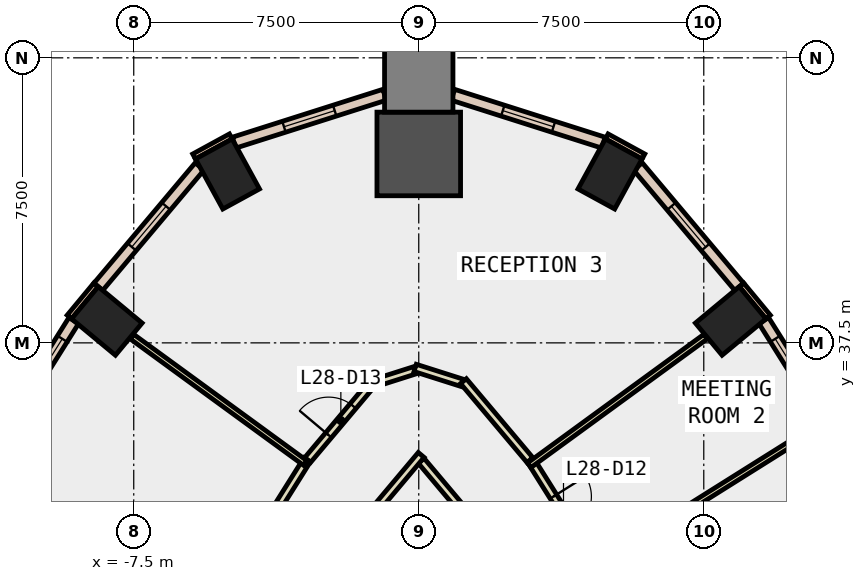
"""IFC4 building model, lengths in metres.
Left out: names, types, materials, properties, quantities, classifications, styles, units other than length and angle.
Written with IfcOpenShell. Run it as: python <this file> out.ifc"""

import sys

from ifc_helpers import new_model, si_unit, direction, frame, frame_2d, origin, origin_2d, place, context, subcontext, project, spatial, rectangle, extrude, element, fill, save


model = new_model("IFC4")
c1 = context("Model", 3, precision=1e-05, world=origin(), true_north=direction((0.0, 1.0)))
c2 = subcontext(c1, "Body", "Model", "MODEL_VIEW")
j1 = project(units=[si_unit("LENGTHUNIT", "METRE"), si_unit("PLANEANGLEUNIT", "RADIAN")], contexts=[c1])
p1 = place(None, origin())
s1 = spatial("IfcSite", under=j1, at=p1, CompositionType="ELEMENT")
p2 = place(p1, origin())
s2 = spatial("IfcBuilding", under=s1, at=p2, CompositionType="ELEMENT")
p3 = place(p2, frame((0.0, 0.0, 128.6)))
s3 = spatial("IfcBuildingStorey", under=s2, at=p3, CompositionType="ELEMENT", Elevation=128.6)
for number, where, z_axis, x_axis in (
    (1, (8.208, 38.077, -0.4), (0.0, 0.0, 1.0), (-0.638, 0.77, 0.0)),
    (2, (5.033, 41.944, -0.4), (0.0, 0.0, 1.0), (-0.877, 0.48, 0.0)),
):
    element("IfcColumn", number, at=place(p3, frame(where, z_axis=z_axis, x_axis=x_axis)), inside=s3, PredefinedType="COLUMN", context=c2, shape_type="SweptSolid", body=[
        extrude(rectangle(XDim=1.1, YDim=1.5, at=origin_2d()), origin(), (0.0, 0.0, 1.0), 4.0),
    ])
p4 = place(p3, frame((0.0, 42.471, -0.4), z_axis=(0.0, 0.0, 1.0), x_axis=(0.0, 1.0, 0.0)))
e3 = element("IfcColumn", 3, at=p4, inside=s3, PredefinedType="COLUMN", context=c2, shape_type="SweptSolid", body=[
    extrude(rectangle(XDim=2.2, YDim=2.2, at=origin_2d()), origin(), (0.0, 0.0, 1.0), 4.0),
])
for number, where, z_axis, x_axis in (
    (4, (-5.033, 41.944, -0.4), (0.0, 0.0, 1.0), (0.877, 0.48, 0.0)),
    (5, (-8.208, 38.077, -0.4), (0.0, 0.0, 1.0), (0.638, 0.77, 0.0)),
):
    element("IfcColumn", number, at=place(p3, frame(where, z_axis=z_axis, x_axis=x_axis)), inside=s3, PredefinedType="COLUMN", context=c2, shape_type="SweptSolid", body=[
        extrude(rectangle(XDim=1.1, YDim=1.5, at=origin_2d()), origin(), (0.0, 0.0, 1.0), 4.0),
    ])
p5 = place(p3, frame((0.0, 44.471, -0.4), z_axis=(0.0, 0.0, 1.0), x_axis=(0.0, 1.0, 0.0)))
e6 = element("IfcColumn", 6, at=p5, inside=s3, PredefinedType="COLUMN", context=c2, shape_type="SweptSolid", body=[
    extrude(rectangle(XDim=1.8, YDim=1.8, at=origin_2d()), origin(), (0.0, 0.0, 1.0), 4.0),
])
for number, where, z_axis, x_axis in (
    (7, (5.912, 42.404, 0.0), (0.0, 0.0, 1.0), (-0.878, 0.479, 0.0)),
    (8, (-4.946, 42.932, 0.0), (0.0, 0.0, 1.0), (-0.878, -0.479, 0.0)),
):
    element("IfcWall", number, at=place(p3, frame(where, z_axis=z_axis, x_axis=x_axis)), inside=s3, PredefinedType="STANDARD", context=c2, shape_type="SweptSolid", body=[
        extrude(rectangle(XDim=1.101, YDim=0.15, at=frame_2d((0.55, 0.0))), origin(), (0.0, 0.0, 1.0), 3.6),
    ])
for number, where, z_axis, x_axis in (
    (9, (9.194, 38.181, 0.0), (0.0, 0.0, 1.0), (-0.639, 0.77, 0.0)),
    (10, (-8.492, 39.027, 0.0), (0.0, 0.0, 1.0), (-0.639, -0.77, 0.0)),
):
    element("IfcWall", number, at=place(p3, frame(where, z_axis=z_axis, x_axis=x_axis)), inside=s3, PredefinedType="STANDARD", context=c2, shape_type="SweptSolid", body=[
        extrude(rectangle(XDim=1.1, YDim=0.15, at=frame_2d((0.55, 0.0))), origin(), (0.0, 0.0, 1.0), 3.6),
    ])
p6 = place(p3, frame((12.41, 32.779, 0.0), z_axis=(0.0, 0.0, 1.0), x_axis=(-0.53160564075, 0.846991996847, 0.0)))
e11 = element("IfcWall", 11, at=p6, inside=s3, PredefinedType="STANDARD", context=c2, shape_type="SweptSolid", body=[
    extrude(rectangle(XDim=6.266, YDim=0.3, at=frame_2d((3.133, 0.0))), origin(), (0.0, 0.0, 1.0), 3.6),
])
p7 = place(p6, frame((0.566, 0.0, 0.9)))
e12 = element("IfcOpeningElement", 12, at=p7, cuts=e11, PredefinedType="OPENING", context=c2, shape_type="SweptSolid", body=[
    extrude(rectangle(XDim=2.0, YDim=2.6, at=frame_2d((1.0, 1.3))), frame((0.0, 0.16, 0.0), z_axis=(0.0, -1.0, 0.0), x_axis=(1.0, 0.0, 0.0)), (0.0, 0.0, 1.0), 0.32),
])
p8 = place(p6, frame((3.699, 0.0, 0.9)))
e13 = element("IfcOpeningElement", 13, at=p8, cuts=e11, PredefinedType="OPENING", context=c2, shape_type="SweptSolid", body=[
    extrude(rectangle(XDim=2.0, YDim=2.6, at=frame_2d((1.0, 1.3))), frame((0.0, 0.16, 0.0), z_axis=(0.0, -1.0, 0.0), x_axis=(1.0, 0.0, 0.0)), (0.0, 0.0, 1.0), 0.32),
])
p9 = place(p3, frame((8.432, 38.976, 0.0), z_axis=(0.0, 0.0, 1.0), x_axis=(-0.643948600943, 0.765068754652, 0.0)))
e14 = element("IfcWall", 14, at=p9, inside=s3, PredefinedType="STANDARD", context=c2, shape_type="SweptSolid", body=[
    extrude(rectangle(XDim=4.138, YDim=0.3, at=frame_2d((2.069, 0.0))), origin(), (0.0, 0.0, 1.0), 3.6),
])
p10 = place(p9, frame((1.369, 0.0, 0.9)))
e15 = element("IfcOpeningElement", 15, at=p10, cuts=e14, PredefinedType="OPENING", context=c2, shape_type="SweptSolid", body=[
    extrude(rectangle(XDim=1.4, YDim=2.6, at=frame_2d((0.7, 1.3))), frame((0.0, 0.16, 0.0), z_axis=(0.0, -1.0, 0.0), x_axis=(1.0, 0.0, 0.0)), (0.0, 0.0, 1.0), 0.32),
])
p11 = place(p3, frame((4.859, 42.769, 0.0), z_axis=(0.0, 0.0, 1.0), x_axis=(-0.952992117398, 0.30299508936, 0.0)))
e16 = element("IfcWall", 16, at=p11, inside=s3, PredefinedType="STANDARD", context=c2, shape_type="SweptSolid", body=[
    extrude(rectangle(XDim=4.155, YDim=0.3, at=frame_2d((2.078, 0.0))), origin(), (0.0, 0.0, 1.0), 3.6),
])
p12 = place(p11, frame((1.378, 0.0, 0.9)))
e17 = element("IfcOpeningElement", 17, at=p12, cuts=e16, PredefinedType="OPENING", context=c2, shape_type="SweptSolid", body=[
    extrude(rectangle(XDim=1.4, YDim=2.6, at=frame_2d((0.7, 1.3))), frame((0.0, 0.16, 0.0), z_axis=(0.0, -1.0, 0.0), x_axis=(1.0, 0.0, 0.0)), (0.0, 0.0, 1.0), 0.32),
])
p13 = place(p3, frame((-0.899, 44.028, 0.0), z_axis=(0.0, 0.0, 1.0), x_axis=(-0.952992117398, -0.30299508936, 0.0)))
e18 = element("IfcWall", 18, at=p13, inside=s3, PredefinedType="STANDARD", context=c2, shape_type="SweptSolid", body=[
    extrude(rectangle(XDim=4.155, YDim=0.3, at=frame_2d((2.078, 0.0))), origin(), (0.0, 0.0, 1.0), 3.6),
])
p14 = place(p13, frame((1.378, 0.0, 0.9)))
e19 = element("IfcOpeningElement", 19, at=p14, cuts=e18, PredefinedType="OPENING", context=c2, shape_type="SweptSolid", body=[
    extrude(rectangle(XDim=1.4, YDim=2.6, at=frame_2d((0.7, 1.3))), frame((0.0, 0.16, 0.0), z_axis=(0.0, -1.0, 0.0), x_axis=(1.0, 0.0, 0.0)), (0.0, 0.0, 1.0), 0.32),
])
p15 = place(p3, frame((-5.767, 42.142, 0.0), z_axis=(0.0, 0.0, 1.0), x_axis=(-0.643948600943, -0.765068754652, 0.0)))
e20 = element("IfcWall", 20, at=p15, inside=s3, PredefinedType="STANDARD", context=c2, shape_type="SweptSolid", body=[
    extrude(rectangle(XDim=4.138, YDim=0.3, at=frame_2d((2.069, 0.0))), origin(), (0.0, 0.0, 1.0), 3.6),
])
p16 = place(p15, frame((1.369, 0.0, 0.9)))
e21 = element("IfcOpeningElement", 21, at=p16, cuts=e20, PredefinedType="OPENING", context=c2, shape_type="SweptSolid", body=[
    extrude(rectangle(XDim=1.4, YDim=2.6, at=frame_2d((0.7, 1.3))), frame((0.0, 0.16, 0.0), z_axis=(0.0, -1.0, 0.0), x_axis=(1.0, 0.0, 0.0)), (0.0, 0.0, 1.0), 0.32),
])
p17 = place(p3, frame((-9.079, 38.086, 0.0), z_axis=(0.0, 0.0, 1.0), x_axis=(-0.53160564075, -0.846991996847, 0.0)))
e22 = element("IfcWall", 22, at=p17, inside=s3, PredefinedType="STANDARD", context=c2, shape_type="SweptSolid", body=[
    extrude(rectangle(XDim=6.266, YDim=0.3, at=frame_2d((3.133, 0.0))), origin(), (0.0, 0.0, 1.0), 3.6),
])
p18 = place(p17, frame((0.566, 0.0, 0.9)))
e23 = element("IfcOpeningElement", 23, at=p18, cuts=e22, PredefinedType="OPENING", context=c2, shape_type="SweptSolid", body=[
    extrude(rectangle(XDim=2.0, YDim=2.6, at=frame_2d((1.0, 1.3))), frame((0.0, 0.16, 0.0), z_axis=(0.0, -1.0, 0.0), x_axis=(1.0, 0.0, 0.0)), (0.0, 0.0, 1.0), 0.32),
])
p19 = place(p17, frame((3.699, 0.0, 0.9)))
e24 = element("IfcOpeningElement", 24, at=p19, cuts=e22, PredefinedType="OPENING", context=c2, shape_type="SweptSolid", body=[
    extrude(rectangle(XDim=2.0, YDim=2.6, at=frame_2d((1.0, 1.3))), frame((0.0, 0.16, 0.0), z_axis=(0.0, -1.0, 0.0), x_axis=(1.0, 0.0, 0.0)), (0.0, 0.0, 1.0), 0.32),
])
p20 = place(p3, frame((1.271, 32.964, 0.0), z_axis=(0.0, 0.0, 1.0), x_axis=(-0.644007376392, 0.765019280249, 0.0)))
e25 = element("IfcWall", 25, at=p20, inside=s3, PredefinedType="PARTITIONING", context=c2, shape_type="SweptSolid", body=[
    extrude(rectangle(XDim=1.874, YDim=0.2, at=frame_2d((0.937, 0.0))), origin(), (0.0, 0.0, 1.0), 3.6),
])
p21 = place(p3, frame((0.064, 34.551, 0.0), z_axis=(0.0, 0.0, 1.0), x_axis=(-0.643638095982, -0.765329995101, 0.0)))
e26 = element("IfcWall", 26, at=p21, inside=s3, PredefinedType="PARTITIONING", context=c2, shape_type="SweptSolid", body=[
    extrude(rectangle(XDim=1.874, YDim=0.2, at=frame_2d((0.937, 0.0))), origin(), (0.0, 0.0, 1.0), 3.6),
])
p22 = place(p3, frame((2.975, 34.361, 0.0), z_axis=(0.0, 0.0, 1.0), x_axis=(0.531740854333, -0.846907116414, 0.0)))
e27 = element("IfcWall", 27, at=p22, inside=s3, PredefinedType="PARTITIONING", context=c2, shape_type="SweptSolid", body=[
    extrude(rectangle(XDim=3.135, YDim=0.2, at=frame_2d((1.567, 0.0))), origin(), (0.0, 0.0, 1.0), 3.6),
])
p23 = place(p22, frame((1.068, 0.0, 0.0)))
e28 = element("IfcOpeningElement", 28, at=p23, cuts=e27, PredefinedType="OPENING", context=c2, shape_type="SweptSolid", body=[
    extrude(rectangle(XDim=1.0, YDim=2.1, at=frame_2d((0.5, 1.05))), frame((0.0, 0.11, 0.0), z_axis=(0.0, -1.0, 0.0), x_axis=(1.0, 0.0, 0.0)), (0.0, 0.0, 1.0), 0.22),
])
p24 = place(p3, frame((-2.924, 34.417, 0.0), z_axis=(0.0, 0.0, 1.0), x_axis=(0.644113583568, 0.764929860486, 0.0)))
e29 = element("IfcWall", 29, at=p24, inside=s3, PredefinedType="PARTITIONING", context=c2, shape_type="SweptSolid", body=[
    extrude(rectangle(XDim=2.714, YDim=0.2, at=frame_2d((1.357, 0.0))), origin(), (0.0, 0.0, 1.0), 3.6),
])
p25 = place(p24, frame((0.857, 0.0, 0.0)))
e30 = element("IfcOpeningElement", 30, at=p25, cuts=e29, PredefinedType="OPENING", context=c2, shape_type="SweptSolid", body=[
    extrude(rectangle(XDim=1.0, YDim=2.1, at=frame_2d((0.5, 1.05))), frame((0.0, 0.11, 0.0), z_axis=(0.0, -1.0, 0.0), x_axis=(1.0, 0.0, 0.0)), (0.0, 0.0, 1.0), 0.22),
])
p26 = place(p3, frame((-1.145, 36.447, 0.0), z_axis=(0.0, 0.0, 1.0), x_axis=(0.952957783381, 0.303103056886, 0.0)))
e31 = element("IfcWall", 31, at=p26, inside=s3, PredefinedType="PARTITIONING", context=c2, shape_type="SweptSolid", body=[
    extrude(rectangle(XDim=1.102, YDim=0.2, at=frame_2d((0.551, 0.0))), origin(), (0.0, 0.0, 1.0), 3.6),
])
p27 = place(p3, frame((-0.095, 36.841, 0.0), z_axis=(0.0, 0.0, 1.0), x_axis=(0.953036611979, -0.302855107646, 0.0)))
e32 = element("IfcWall", 32, at=p27, inside=s3, PredefinedType="PARTITIONING", context=c2, shape_type="SweptSolid", body=[
    extrude(rectangle(XDim=1.301, YDim=0.2, at=frame_2d((0.65, 0.0))), origin(), (0.0, 0.0, 1.0), 3.6),
])
p28 = place(p3, frame((1.176, 36.493, 0.0), z_axis=(0.0, 0.0, 1.0), x_axis=(0.644113583568, -0.764929860486, 0.0)))
e33 = element("IfcWall", 33, at=p28, inside=s3, PredefinedType="PARTITIONING", context=c2, shape_type="SweptSolid", body=[
    extrude(rectangle(XDim=2.714, YDim=0.2, at=frame_2d((1.357, 0.0))), origin(), (0.0, 0.0, 1.0), 3.6),
])
p29 = place(p3, frame((-6.626, 28.546, 0.0), z_axis=(0.0, 0.0, 1.0), x_axis=(0.531701842465, 0.846931609234, 0.0)))
e34 = element("IfcWall", 34, at=p29, inside=s3, PredefinedType="PARTITIONING", context=c2, shape_type="SweptSolid", body=[
    extrude(rectangle(XDim=6.942, YDim=0.2, at=frame_2d((3.471, 0.0))), origin(), (0.0, 0.0, 1.0), 3.6),
])
p30 = place(p3, frame((4.597, 31.589, 0.0), z_axis=(0.0, 0.0, 1.0), x_axis=(0.846980720953, 0.531623605885, 0.0)))
e35 = element("IfcWall", 35, at=p30, inside=s3, PredefinedType="PARTITIONING", context=c2, shape_type="SweptSolid", body=[
    extrude(rectangle(XDim=7.101, YDim=0.15, at=frame_2d((3.55, 0.0))), origin(), (0.0, 0.0, 1.0), 3.6),
])
p31 = place(p3, frame((2.908, 34.281, 0.0), z_axis=(0.0, 0.0, 1.0), x_axis=(0.807935867, 0.589270425879, 0.0)))
e36 = element("IfcWall", 36, at=p31, inside=s3, PredefinedType="PARTITIONING", context=c2, shape_type="SweptSolid", body=[
    extrude(rectangle(XDim=5.744, YDim=0.15, at=frame_2d((2.872, 0.0))), origin(), (0.0, 0.0, 1.0), 3.6),
])
p32 = place(p3, frame((-2.989, 34.34, 0.0), z_axis=(0.0, 0.0, 1.0), x_axis=(-0.807932877043, 0.589274525322, 0.0)))
e37 = element("IfcWall", 37, at=p32, inside=s3, PredefinedType="PARTITIONING", context=c2, shape_type="SweptSolid", body=[
    extrude(rectangle(XDim=5.644, YDim=0.15, at=frame_2d((2.822, 0.0))), origin(), (0.0, 0.0, 1.0), 3.6),
])
p33 = place(p8, origin())
e38 = element("IfcWindow", 38, at=p33, inside=s3, PartitioningType="SINGLE_PANEL", PredefinedType="WINDOW", context=c2, shape_type="SweptSolid", body=[
    extrude(rectangle(XDim=2.0, YDim=2.6, at=frame_2d((1.0, 1.3))), frame((0.0, 0.03, 0.0), z_axis=(0.0, -1.0, 0.0), x_axis=(1.0, 0.0, 0.0)), (0.0, 0.0, 1.0), 0.06),
])
fill(e13, e38)
p34 = place(p10, origin())
e39 = element("IfcWindow", 39, at=p34, inside=s3, PartitioningType="SINGLE_PANEL", PredefinedType="WINDOW", context=c2, shape_type="SweptSolid", body=[
    extrude(rectangle(XDim=1.4, YDim=2.6, at=frame_2d((0.7, 1.3))), frame((0.0, 0.03, 0.0), z_axis=(0.0, -1.0, 0.0), x_axis=(1.0, 0.0, 0.0)), (0.0, 0.0, 1.0), 0.06),
])
fill(e15, e39)
p35 = place(p12, origin())
e40 = element("IfcWindow", 40, at=p35, inside=s3, PartitioningType="SINGLE_PANEL", PredefinedType="WINDOW", context=c2, shape_type="SweptSolid", body=[
    extrude(rectangle(XDim=1.4, YDim=2.6, at=frame_2d((0.7, 1.3))), frame((0.0, 0.03, 0.0), z_axis=(0.0, -1.0, 0.0), x_axis=(1.0, 0.0, 0.0)), (0.0, 0.0, 1.0), 0.06),
])
fill(e17, e40)
p36 = place(p14, origin())
e41 = element("IfcWindow", 41, at=p36, inside=s3, PartitioningType="SINGLE_PANEL", PredefinedType="WINDOW", context=c2, shape_type="SweptSolid", body=[
    extrude(rectangle(XDim=1.4, YDim=2.6, at=frame_2d((0.7, 1.3))), frame((0.0, 0.03, 0.0), z_axis=(0.0, -1.0, 0.0), x_axis=(1.0, 0.0, 0.0)), (0.0, 0.0, 1.0), 0.06),
])
fill(e19, e41)
p37 = place(p16, origin())
e42 = element("IfcWindow", 42, at=p37, inside=s3, PartitioningType="SINGLE_PANEL", PredefinedType="WINDOW", context=c2, shape_type="SweptSolid", body=[
    extrude(rectangle(XDim=1.4, YDim=2.6, at=frame_2d((0.7, 1.3))), frame((0.0, 0.03, 0.0), z_axis=(0.0, -1.0, 0.0), x_axis=(1.0, 0.0, 0.0)), (0.0, 0.0, 1.0), 0.06),
])
fill(e21, e42)
p38 = place(p18, origin())
e43 = element("IfcWindow", 43, at=p38, inside=s3, PartitioningType="SINGLE_PANEL", PredefinedType="WINDOW", context=c2, shape_type="SweptSolid", body=[
    extrude(rectangle(XDim=2.0, YDim=2.6, at=frame_2d((1.0, 1.3))), frame((0.0, 0.03, 0.0), z_axis=(0.0, -1.0, 0.0), x_axis=(1.0, 0.0, 0.0)), (0.0, 0.0, 1.0), 0.06),
])
fill(e23, e43)
p39 = place(p23, origin())
e44 = element("IfcDoor", 44, at=p39, inside=s3, OperationType="SINGLE_SWING_LEFT", PredefinedType="DOOR", context=c2, shape_type="SweptSolid", body=[
    extrude(rectangle(XDim=1.0, YDim=2.1, at=frame_2d((0.5, 1.05))), frame((0.0, 0.025, 0.0), z_axis=(0.0, -1.0, 0.0), x_axis=(1.0, 0.0, 0.0)), (0.0, 0.0, 1.0), 0.05),
])
fill(e28, e44)
p40 = place(p25, origin())
e45 = element("IfcDoor", 45, at=p40, inside=s3, OperationType="SINGLE_SWING_LEFT", PredefinedType="DOOR", context=c2, shape_type="SweptSolid", body=[
    extrude(rectangle(XDim=1.0, YDim=2.1, at=frame_2d((0.5, 1.05))), frame((0.0, 0.025, 0.0), z_axis=(0.0, -1.0, 0.0), x_axis=(1.0, 0.0, 0.0)), (0.0, 0.0, 1.0), 0.05),
])
fill(e30, e45)
save(model, sys.argv[1])
